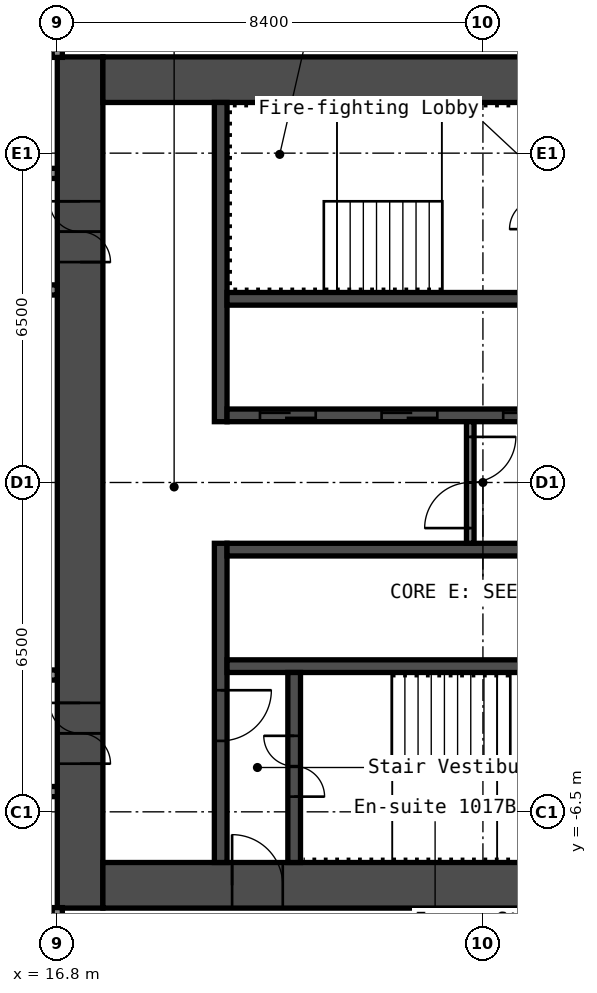
"""IFC4 building model, lengths in metres.
Left out: names, types, materials, properties, quantities, classifications, styles, units other than length and angle.
Written with IfcOpenShell. Run it as: python <this file> out.ifc"""

import sys

from ifc_helpers import new_model, si_unit, direction, frame, frame_2d, origin, place, context, subcontext, project, spatial, rectangle, extrude, element, fill, save


model = new_model("IFC4")
c1 = context("Model", 3, precision=1e-05, world=origin(), true_north=direction((0.0, 1.0)))
c2 = subcontext(c1, "Body", "Model", "MODEL_VIEW")
j1 = project(units=[si_unit("LENGTHUNIT", "METRE"), si_unit("PLANEANGLEUNIT", "RADIAN")], contexts=[c1])
p1 = place(None, origin())
s1 = spatial("IfcSite", under=j1, at=p1, CompositionType="ELEMENT")
p2 = place(p1, origin())
s2 = spatial("IfcBuilding", under=s1, at=p2, CompositionType="ELEMENT")
p3 = place(p2, frame((0.0, 0.0, 39.0)))
s3 = spatial("IfcBuildingStorey", under=s2, at=p3, CompositionType="ELEMENT", Elevation=39.0)
p4 = place(p3, frame((17.25, -8.4, 0.0), z_axis=(0.0, 0.0, 1.0), x_axis=(0.0, 1.0, 0.0)))
e1 = element("IfcWall", 1, at=p4, inside=s3, PredefinedType="SHEAR", context=c2, shape_type="SweptSolid", body=[
    extrude(rectangle(XDim=16.8, YDim=0.9, at=frame_2d((8.4, 0.0))), origin(), (0.0, 0.0, 1.0), 2.8),
])
p5 = place(p4, frame((12.75, 0.0, 0.0)))
e2 = element("IfcOpeningElement", 2, at=p5, cuts=e1, PredefinedType="OPENING", context=c2, shape_type="SweptSolid", body=[
    extrude(rectangle(XDim=1.2, YDim=2.1, at=frame_2d((0.6, 1.05))), frame((0.0, 0.46, 0.0), z_axis=(0.0, -1.0, 0.0), x_axis=(1.0, 0.0, 0.0)), (0.0, 0.0, 1.0), 0.92),
])
p6 = place(p4, frame((2.85, 0.0, 0.0)))
e3 = element("IfcOpeningElement", 3, at=p6, cuts=e1, PredefinedType="OPENING", context=c2, shape_type="SweptSolid", body=[
    extrude(rectangle(XDim=1.2, YDim=2.1, at=frame_2d((0.6, 1.05))), frame((0.0, 0.46, 0.0), z_axis=(0.0, -1.0, 0.0), x_axis=(1.0, 0.0, 0.0)), (0.0, 0.0, 1.0), 0.92),
])
p7 = place(p3, frame((17.7, 7.95, 0.0), z_axis=(0.0, 0.0, 1.0), x_axis=(1.0, 0.0, 0.0)))
e4 = element("IfcWall", 4, at=p7, inside=s3, PredefinedType="SHEAR", context=c2, shape_type="SweptSolid", body=[
    extrude(rectangle(XDim=15.0, YDim=0.9, at=frame_2d((7.5, 0.0))), origin(), (0.0, 0.0, 1.0), 2.8),
])
p8 = place(p7, frame((10.4, 0.0, 0.0)))
e5 = element("IfcOpeningElement", 5, at=p8, cuts=e4, PredefinedType="OPENING", context=c2, shape_type="SweptSolid", body=[
    extrude(rectangle(XDim=1.2, YDim=2.1, at=frame_2d((0.6, 1.05))), frame((0.0, 0.46, 0.0), z_axis=(0.0, -1.0, 0.0), x_axis=(1.0, 0.0, 0.0)), (0.0, 0.0, 1.0), 0.92),
])
p9 = place(p7, frame((13.35, 0.0, 0.0)))
e6 = element("IfcOpeningElement", 6, at=p9, cuts=e4, PredefinedType="OPENING", context=c2, shape_type="SweptSolid", body=[
    extrude(rectangle(XDim=0.9, YDim=2.1, at=frame_2d((0.45, 1.05))), frame((0.0, 0.46, 0.0), z_axis=(0.0, -1.0, 0.0), x_axis=(1.0, 0.0, 0.0)), (0.0, 0.0, 1.0), 0.92),
])
p10 = place(p3, frame((17.7, -7.95, 0.0), z_axis=(0.0, 0.0, 1.0), x_axis=(1.0, 0.0, 0.0)))
e7 = element("IfcWall", 7, at=p10, inside=s3, PredefinedType="SHEAR", context=c2, shape_type="SweptSolid", body=[
    extrude(rectangle(XDim=15.0, YDim=0.9, at=frame_2d((7.5, 0.0))), origin(), (0.0, 0.0, 1.0), 2.8),
])
p11 = place(p10, frame((2.55, 0.0, 0.0)))
e8 = element("IfcOpeningElement", 8, at=p11, cuts=e7, PredefinedType="OPENING", context=c2, shape_type="SweptSolid", body=[
    extrude(rectangle(XDim=1.0, YDim=2.1, at=frame_2d((0.5, 1.05))), frame((0.0, 0.46, 0.0), z_axis=(0.0, -1.0, 0.0), x_axis=(1.0, 0.0, 0.0)), (0.0, 0.0, 1.0), 0.92),
])
p12 = place(p3, frame((20.025, 1.2, 0.0), z_axis=(0.0, 0.0, 1.0), x_axis=(0.0, 1.0, 0.0)))
e9 = element("IfcWall", 9, at=p12, inside=s3, PredefinedType="SHEAR", context=c2, shape_type="SweptSolid", body=[
    extrude(rectangle(XDim=6.3, YDim=0.25, at=frame_2d((3.15, 0.0))), origin(), (0.0, 0.0, 1.0), 2.8),
])
p13 = place(p3, frame((20.025, -7.5, 0.0), z_axis=(0.0, 0.0, 1.0), x_axis=(0.0, 1.0, 0.0)))
e10 = element("IfcWall", 10, at=p13, inside=s3, PredefinedType="SHEAR", context=c2, shape_type="SweptSolid", body=[
    extrude(rectangle(XDim=6.3, YDim=0.25, at=frame_2d((3.15, 0.0))), origin(), (0.0, 0.0, 1.0), 2.8),
])
p14 = place(p13, frame((2.4, 0.0, 0.0)))
e11 = element("IfcOpeningElement", 11, at=p14, cuts=e10, PredefinedType="OPENING", context=c2, shape_type="SweptSolid", body=[
    extrude(rectangle(XDim=1.0, YDim=2.1, at=frame_2d((0.5, 1.05))), frame((0.0, 0.135, 0.0), z_axis=(0.0, -1.0, 0.0), x_axis=(1.0, 0.0, 0.0)), (0.0, 0.0, 1.0), 0.27),
])
p15 = place(p3, frame((20.15, 1.325, 0.0), z_axis=(0.0, 0.0, 1.0), x_axis=(1.0, 0.0, 0.0)))
e12 = element("IfcWall", 12, at=p15, inside=s3, PredefinedType="SHEAR", context=c2, shape_type="SweptSolid", body=[
    extrude(rectangle(XDim=7.5, YDim=0.25, at=frame_2d((3.75, 0.0))), origin(), (0.0, 0.0, 1.0), 2.8),
])
p16 = place(p15, frame((0.65, 0.0, 0.0)))
e13 = element("IfcOpeningElement", 13, at=p16, cuts=e12, PredefinedType="OPENING", context=c2, shape_type="SweptSolid", body=[
    extrude(rectangle(XDim=1.1, YDim=2.1, at=frame_2d((0.55, 1.05))), frame((0.0, 0.135, 0.0), z_axis=(0.0, -1.0, 0.0), x_axis=(1.0, 0.0, 0.0)), (0.0, 0.0, 1.0), 0.27),
])
p17 = place(p15, frame((3.05, 0.0, 0.0)))
e14 = element("IfcOpeningElement", 14, at=p17, cuts=e12, PredefinedType="OPENING", context=c2, shape_type="SweptSolid", body=[
    extrude(rectangle(XDim=1.1, YDim=2.1, at=frame_2d((0.55, 1.05))), frame((0.0, 0.135, 0.0), z_axis=(0.0, -1.0, 0.0), x_axis=(1.0, 0.0, 0.0)), (0.0, 0.0, 1.0), 0.27),
])
p18 = place(p15, frame((5.45, 0.0, 0.0)))
e15 = element("IfcOpeningElement", 15, at=p18, cuts=e12, PredefinedType="OPENING", context=c2, shape_type="SweptSolid", body=[
    extrude(rectangle(XDim=1.1, YDim=2.1, at=frame_2d((0.55, 1.05))), frame((0.0, 0.135, 0.0), z_axis=(0.0, -1.0, 0.0), x_axis=(1.0, 0.0, 0.0)), (0.0, 0.0, 1.0), 0.27),
])
for number, where, z_axis, x_axis in (
    (16, (20.15, 3.625, 0.0), (0.0, 0.0, 1.0), (1.0, 0.0, 0.0)),
    (17, (20.15, -1.325, 0.0), (0.0, 0.0, 1.0), (1.0, 0.0, 0.0)),
    (18, (20.15, -3.625, 0.0), (0.0, 0.0, 1.0), (1.0, 0.0, 0.0)),
):
    element("IfcWall", number, at=place(p3, frame(where, z_axis=z_axis, x_axis=x_axis)), inside=s3, PredefinedType="SHEAR", context=c2, shape_type="SweptSolid", body=[
        extrude(rectangle(XDim=7.5, YDim=0.25, at=frame_2d((3.75, 0.0))), origin(), (0.0, 0.0, 1.0), 2.8),
    ])
p19 = place(p3, frame((21.475, -7.5, 0.0), z_axis=(0.0, 0.0, 1.0), x_axis=(0.0, 1.0, 0.0)))
e19 = element("IfcWall", 19, at=p19, inside=s3, PredefinedType="SHEAR", context=c2, shape_type="SweptSolid", body=[
    extrude(rectangle(XDim=3.75, YDim=0.25, at=frame_2d((1.875, 0.0))), origin(), (0.0, 0.0, 1.0), 2.8),
])
p20 = place(p19, frame((1.3, 0.0, 0.0)))
e20 = element("IfcOpeningElement", 20, at=p20, cuts=e19, PredefinedType="OPENING", context=c2, shape_type="SweptSolid", body=[
    extrude(rectangle(XDim=1.2, YDim=2.1, at=frame_2d((0.6, 1.05))), frame((0.0, 0.135, 0.0), z_axis=(0.0, -1.0, 0.0), x_axis=(1.0, 0.0, 0.0)), (0.0, 0.0, 1.0), 0.27),
])
p21 = place(p3, frame((24.95, -1.2, 0.0), z_axis=(0.0, 0.0, 1.0), x_axis=(0.0, 1.0, 0.0)))
e21 = element("IfcWall", 21, at=p21, inside=s3, PredefinedType="PARTITIONING", context=c2, shape_type="SweptSolid", body=[
    extrude(rectangle(XDim=2.4, YDim=0.15, at=frame_2d((1.2, 0.0))), origin(), (0.0, 0.0, 1.0), 2.8),
])
p22 = place(p21, frame((0.3, 0.0, 0.0)))
e22 = element("IfcOpeningElement", 22, at=p22, cuts=e21, PredefinedType="OPENING", context=c2, shape_type="SweptSolid", body=[
    extrude(rectangle(XDim=1.8, YDim=2.1, at=frame_2d((0.9, 1.05))), frame((0.0, 0.085, 0.0), z_axis=(0.0, -1.0, 0.0), x_axis=(1.0, 0.0, 0.0)), (0.0, 0.0, 1.0), 0.17),
])
p23 = place(p3, frame((-16.8, -6.1, 0.0), z_axis=(0.0, 0.0, 1.0), x_axis=(1.0, 0.0, 0.0)))
e23 = element("IfcWall", 23, at=p23, inside=s3, PredefinedType="PARTITIONING", context=c2, shape_type="SweptSolid", body=[
    extrude(rectangle(XDim=33.6, YDim=0.2, at=frame_2d((16.8, 0.0))), origin(), (0.0, 0.0, 1.0), 2.8),
])
p24 = place(p23, frame((2.85, 0.0, 0.0)))
e24 = element("IfcOpeningElement", 24, at=p24, cuts=e23, PredefinedType="OPENING", context=c2, shape_type="SweptSolid", body=[
    extrude(rectangle(XDim=1.0, YDim=2.1, at=frame_2d((0.5, 1.05))), frame((0.0, 0.11, 0.0), z_axis=(0.0, -1.0, 0.0), x_axis=(1.0, 0.0, 0.0)), (0.0, 0.0, 1.0), 0.22),
])
p25 = place(p23, frame((4.55, 0.0, 0.0)))
e25 = element("IfcOpeningElement", 25, at=p25, cuts=e23, PredefinedType="OPENING", context=c2, shape_type="SweptSolid", body=[
    extrude(rectangle(XDim=1.0, YDim=2.1, at=frame_2d((0.5, 1.05))), frame((0.0, 0.11, 0.0), z_axis=(0.0, -1.0, 0.0), x_axis=(1.0, 0.0, 0.0)), (0.0, 0.0, 1.0), 0.22),
])
p26 = place(p23, frame((11.25, 0.0, 0.0)))
e26 = element("IfcOpeningElement", 26, at=p26, cuts=e23, PredefinedType="OPENING", context=c2, shape_type="SweptSolid", body=[
    extrude(rectangle(XDim=1.0, YDim=2.1, at=frame_2d((0.5, 1.05))), frame((0.0, 0.11, 0.0), z_axis=(0.0, -1.0, 0.0), x_axis=(1.0, 0.0, 0.0)), (0.0, 0.0, 1.0), 0.22),
])
p27 = place(p23, frame((12.95, 0.0, 0.0)))
e27 = element("IfcOpeningElement", 27, at=p27, cuts=e23, PredefinedType="OPENING", context=c2, shape_type="SweptSolid", body=[
    extrude(rectangle(XDim=1.0, YDim=2.1, at=frame_2d((0.5, 1.05))), frame((0.0, 0.11, 0.0), z_axis=(0.0, -1.0, 0.0), x_axis=(1.0, 0.0, 0.0)), (0.0, 0.0, 1.0), 0.22),
])
p28 = place(p23, frame((18.28, 0.0, 0.0)))
e28 = element("IfcOpeningElement", 28, at=p28, cuts=e23, PredefinedType="OPENING", context=c2, shape_type="SweptSolid", body=[
    extrude(rectangle(XDim=0.9, YDim=2.1, at=frame_2d((0.45, 1.05))), frame((0.0, 0.11, 0.0), z_axis=(0.0, -1.0, 0.0), x_axis=(1.0, 0.0, 0.0)), (0.0, 0.0, 1.0), 0.22),
])
p29 = place(p23, frame((22.48, 0.0, 0.0)))
e29 = element("IfcOpeningElement", 29, at=p29, cuts=e23, PredefinedType="OPENING", context=c2, shape_type="SweptSolid", body=[
    extrude(rectangle(XDim=0.9, YDim=2.1, at=frame_2d((0.45, 1.05))), frame((0.0, 0.11, 0.0), z_axis=(0.0, -1.0, 0.0), x_axis=(1.0, 0.0, 0.0)), (0.0, 0.0, 1.0), 0.22),
])
p30 = place(p23, frame((28.05, 0.0, 0.0)))
e30 = element("IfcOpeningElement", 30, at=p30, cuts=e23, PredefinedType="OPENING", context=c2, shape_type="SweptSolid", body=[
    extrude(rectangle(XDim=1.0, YDim=2.1, at=frame_2d((0.5, 1.05))), frame((0.0, 0.11, 0.0), z_axis=(0.0, -1.0, 0.0), x_axis=(1.0, 0.0, 0.0)), (0.0, 0.0, 1.0), 0.22),
])
p31 = place(p23, frame((29.75, 0.0, 0.0)))
e31 = element("IfcOpeningElement", 31, at=p31, cuts=e23, PredefinedType="OPENING", context=c2, shape_type="SweptSolid", body=[
    extrude(rectangle(XDim=1.0, YDim=2.1, at=frame_2d((0.5, 1.05))), frame((0.0, 0.11, 0.0), z_axis=(0.0, -1.0, 0.0), x_axis=(1.0, 0.0, 0.0)), (0.0, 0.0, 1.0), 0.22),
])
p32 = place(p3, frame((-16.8, -3.8, 0.0), z_axis=(0.0, 0.0, 1.0), x_axis=(1.0, 0.0, 0.0)))
e32 = element("IfcWall", 32, at=p32, inside=s3, PredefinedType="PARTITIONING", context=c2, shape_type="SweptSolid", body=[
    extrude(rectangle(XDim=33.6, YDim=0.2, at=frame_2d((16.8, 0.0))), origin(), (0.0, 0.0, 1.0), 2.8),
])
p33 = place(p32, frame((10.22, 0.0, 0.0)))
e33 = element("IfcOpeningElement", 33, at=p33, cuts=e32, PredefinedType="OPENING", context=c2, shape_type="SweptSolid", body=[
    extrude(rectangle(XDim=0.9, YDim=2.1, at=frame_2d((0.45, 1.05))), frame((0.0, 0.11, 0.0), z_axis=(0.0, -1.0, 0.0), x_axis=(1.0, 0.0, 0.0)), (0.0, 0.0, 1.0), 0.22),
])
p34 = place(p32, frame((14.42, 0.0, 0.0)))
e34 = element("IfcOpeningElement", 34, at=p34, cuts=e32, PredefinedType="OPENING", context=c2, shape_type="SweptSolid", body=[
    extrude(rectangle(XDim=0.9, YDim=2.1, at=frame_2d((0.45, 1.05))), frame((0.0, 0.11, 0.0), z_axis=(0.0, -1.0, 0.0), x_axis=(1.0, 0.0, 0.0)), (0.0, 0.0, 1.0), 0.22),
])
p35 = place(p32, frame((27.1, 0.0, 0.0)))
e35 = element("IfcOpeningElement", 35, at=p35, cuts=e32, PredefinedType="OPENING", context=c2, shape_type="SweptSolid", body=[
    extrude(rectangle(XDim=0.9, YDim=2.1, at=frame_2d((0.45, 1.05))), frame((0.0, 0.11, 0.0), z_axis=(0.0, -1.0, 0.0), x_axis=(1.0, 0.0, 0.0)), (0.0, 0.0, 1.0), 0.22),
])
p36 = place(p32, frame((31.3, 0.0, 0.0)))
e36 = element("IfcOpeningElement", 36, at=p36, cuts=e32, PredefinedType="OPENING", context=c2, shape_type="SweptSolid", body=[
    extrude(rectangle(XDim=0.9, YDim=2.1, at=frame_2d((0.45, 1.05))), frame((0.0, 0.11, 0.0), z_axis=(0.0, -1.0, 0.0), x_axis=(1.0, 0.0, 0.0)), (0.0, 0.0, 1.0), 0.22),
])
p37 = place(p3, frame((-16.8, 3.8, 0.0), z_axis=(0.0, 0.0, 1.0), x_axis=(1.0, 0.0, 0.0)))
e37 = element("IfcWall", 37, at=p37, inside=s3, PredefinedType="PARTITIONING", context=c2, shape_type="SweptSolid", body=[
    extrude(rectangle(XDim=33.6, YDim=0.2, at=frame_2d((16.8, 0.0))), origin(), (0.0, 0.0, 1.0), 2.8),
])
p38 = place(p37, frame((1.145, 0.0, 0.0)))
e38 = element("IfcOpeningElement", 38, at=p38, cuts=e37, PredefinedType="OPENING", context=c2, shape_type="SweptSolid", body=[
    extrude(rectangle(XDim=0.9, YDim=2.1, at=frame_2d((0.45, 1.05))), frame((0.0, 0.11, 0.0), z_axis=(0.0, -1.0, 0.0), x_axis=(1.0, 0.0, 0.0)), (0.0, 0.0, 1.0), 0.22),
])
p39 = place(p37, frame((5.345, 0.0, 0.0)))
e39 = element("IfcOpeningElement", 39, at=p39, cuts=e37, PredefinedType="OPENING", context=c2, shape_type="SweptSolid", body=[
    extrude(rectangle(XDim=0.9, YDim=2.1, at=frame_2d((0.45, 1.05))), frame((0.0, 0.11, 0.0), z_axis=(0.0, -1.0, 0.0), x_axis=(1.0, 0.0, 0.0)), (0.0, 0.0, 1.0), 0.22),
])
p40 = place(p37, frame((18.87, 0.0, 0.0)))
e40 = element("IfcOpeningElement", 40, at=p40, cuts=e37, PredefinedType="OPENING", context=c2, shape_type="SweptSolid", body=[
    extrude(rectangle(XDim=0.9, YDim=2.1, at=frame_2d((0.45, 1.05))), frame((0.0, 0.11, 0.0), z_axis=(0.0, -1.0, 0.0), x_axis=(1.0, 0.0, 0.0)), (0.0, 0.0, 1.0), 0.22),
])
p41 = place(p37, frame((23.07, 0.0, 0.0)))
e41 = element("IfcOpeningElement", 41, at=p41, cuts=e37, PredefinedType="OPENING", context=c2, shape_type="SweptSolid", body=[
    extrude(rectangle(XDim=0.9, YDim=2.1, at=frame_2d((0.45, 1.05))), frame((0.0, 0.11, 0.0), z_axis=(0.0, -1.0, 0.0), x_axis=(1.0, 0.0, 0.0)), (0.0, 0.0, 1.0), 0.22),
])
p42 = place(p3, frame((-16.8, 6.1, 0.0), z_axis=(0.0, 0.0, 1.0), x_axis=(1.0, 0.0, 0.0)))
e42 = element("IfcWall", 42, at=p42, inside=s3, PredefinedType="PARTITIONING", context=c2, shape_type="SweptSolid", body=[
    extrude(rectangle(XDim=33.6, YDim=0.2, at=frame_2d((16.8, 0.0))), origin(), (0.0, 0.0, 1.0), 2.8),
])
p43 = place(p42, frame((2.85, 0.0, 0.0)))
e43 = element("IfcOpeningElement", 43, at=p43, cuts=e42, PredefinedType="OPENING", context=c2, shape_type="SweptSolid", body=[
    extrude(rectangle(XDim=1.0, YDim=2.1, at=frame_2d((0.5, 1.05))), frame((0.0, 0.11, 0.0), z_axis=(0.0, -1.0, 0.0), x_axis=(1.0, 0.0, 0.0)), (0.0, 0.0, 1.0), 0.22),
])
p44 = place(p42, frame((4.55, 0.0, 0.0)))
e44 = element("IfcOpeningElement", 44, at=p44, cuts=e42, PredefinedType="OPENING", context=c2, shape_type="SweptSolid", body=[
    extrude(rectangle(XDim=1.0, YDim=2.1, at=frame_2d((0.5, 1.05))), frame((0.0, 0.11, 0.0), z_axis=(0.0, -1.0, 0.0), x_axis=(1.0, 0.0, 0.0)), (0.0, 0.0, 1.0), 0.22),
])
p45 = place(p42, frame((10.555, 0.0, 0.0)))
e45 = element("IfcOpeningElement", 45, at=p45, cuts=e42, PredefinedType="OPENING", context=c2, shape_type="SweptSolid", body=[
    extrude(rectangle(XDim=0.9, YDim=2.1, at=frame_2d((0.45, 1.05))), frame((0.0, 0.11, 0.0), z_axis=(0.0, -1.0, 0.0), x_axis=(1.0, 0.0, 0.0)), (0.0, 0.0, 1.0), 0.22),
])
p46 = place(p42, frame((14.755, 0.0, 0.0)))
e46 = element("IfcOpeningElement", 46, at=p46, cuts=e42, PredefinedType="OPENING", context=c2, shape_type="SweptSolid", body=[
    extrude(rectangle(XDim=0.9, YDim=2.1, at=frame_2d((0.45, 1.05))), frame((0.0, 0.11, 0.0), z_axis=(0.0, -1.0, 0.0), x_axis=(1.0, 0.0, 0.0)), (0.0, 0.0, 1.0), 0.22),
])
p47 = place(p42, frame((19.65, 0.0, 0.0)))
e47 = element("IfcOpeningElement", 47, at=p47, cuts=e42, PredefinedType="OPENING", context=c2, shape_type="SweptSolid", body=[
    extrude(rectangle(XDim=1.0, YDim=2.1, at=frame_2d((0.5, 1.05))), frame((0.0, 0.11, 0.0), z_axis=(0.0, -1.0, 0.0), x_axis=(1.0, 0.0, 0.0)), (0.0, 0.0, 1.0), 0.22),
])
p48 = place(p42, frame((21.35, 0.0, 0.0)))
e48 = element("IfcOpeningElement", 48, at=p48, cuts=e42, PredefinedType="OPENING", context=c2, shape_type="SweptSolid", body=[
    extrude(rectangle(XDim=1.0, YDim=2.1, at=frame_2d((0.5, 1.05))), frame((0.0, 0.11, 0.0), z_axis=(0.0, -1.0, 0.0), x_axis=(1.0, 0.0, 0.0)), (0.0, 0.0, 1.0), 0.22),
])
p49 = place(p42, frame((28.05, 0.0, 0.0)))
e49 = element("IfcOpeningElement", 49, at=p49, cuts=e42, PredefinedType="OPENING", context=c2, shape_type="SweptSolid", body=[
    extrude(rectangle(XDim=1.0, YDim=2.1, at=frame_2d((0.5, 1.05))), frame((0.0, 0.11, 0.0), z_axis=(0.0, -1.0, 0.0), x_axis=(1.0, 0.0, 0.0)), (0.0, 0.0, 1.0), 0.22),
])
p50 = place(p42, frame((29.75, 0.0, 0.0)))
e50 = element("IfcOpeningElement", 50, at=p50, cuts=e42, PredefinedType="OPENING", context=c2, shape_type="SweptSolid", body=[
    extrude(rectangle(XDim=1.0, YDim=2.1, at=frame_2d((0.5, 1.05))), frame((0.0, 0.11, 0.0), z_axis=(0.0, -1.0, 0.0), x_axis=(1.0, 0.0, 0.0)), (0.0, 0.0, 1.0), 0.22),
])
for number, where, z_axis, x_axis in (
    (51, (16.8, -20.3, 0.0), (0.0, 0.0, 1.0), (0.0, 1.0, 0.0)),
    (52, (16.8, 8.39, 0.0), (0.0, 0.0, 1.0), (0.0, 1.0, 0.0)),
):
    element("IfcWall", number, at=place(p3, frame(where, z_axis=z_axis, x_axis=x_axis)), inside=s3, PredefinedType="PARTITIONING", context=c2, shape_type="SweptSolid", body=[
        extrude(rectangle(XDim=11.91, YDim=0.2, at=frame_2d((5.955, 0.0))), origin(), (0.0, 0.0, 1.0), 2.8),
    ])
p51 = place(p5, origin())
e53 = element("IfcDoor", 53, at=p51, inside=s3, OperationType="DOUBLE_DOOR_SINGLE_SWING", PredefinedType="DOOR", context=c2, shape_type="SweptSolid", body=[
    extrude(rectangle(XDim=1.2, YDim=2.1, at=frame_2d((0.6, 1.05))), frame((0.0, 0.025, 0.0), z_axis=(0.0, -1.0, 0.0), x_axis=(1.0, 0.0, 0.0)), (0.0, 0.0, 1.0), 0.05),
])
fill(e2, e53)
p52 = place(p6, origin())
e54 = element("IfcDoor", 54, at=p52, inside=s3, OperationType="DOUBLE_DOOR_SINGLE_SWING", PredefinedType="DOOR", context=c2, shape_type="SweptSolid", body=[
    extrude(rectangle(XDim=1.2, YDim=2.1, at=frame_2d((0.6, 1.05))), frame((0.0, 0.025, 0.0), z_axis=(0.0, -1.0, 0.0), x_axis=(1.0, 0.0, 0.0)), (0.0, 0.0, 1.0), 0.05),
])
fill(e3, e54)
p53 = place(p11, origin())
e55 = element("IfcDoor", 55, at=p53, inside=s3, OperationType="SINGLE_SWING_RIGHT", PredefinedType="DOOR", context=c2, shape_type="SweptSolid", body=[
    extrude(rectangle(XDim=1.0, YDim=2.1, at=frame_2d((0.5, 1.05))), frame((0.0, 0.025, 0.0), z_axis=(0.0, -1.0, 0.0), x_axis=(1.0, 0.0, 0.0)), (0.0, 0.0, 1.0), 0.05),
])
fill(e8, e55)
p54 = place(p20, origin())
e56 = element("IfcDoor", 56, at=p54, inside=s3, OperationType="DOUBLE_DOOR_SINGLE_SWING", PredefinedType="DOOR", context=c2, shape_type="SweptSolid", body=[
    extrude(rectangle(XDim=1.2, YDim=2.1, at=frame_2d((0.6, 1.05))), frame((0.0, 0.025, 0.0), z_axis=(0.0, -1.0, 0.0), x_axis=(1.0, 0.0, 0.0)), (0.0, 0.0, 1.0), 0.05),
])
fill(e20, e56)
p55 = place(p14, origin())
e57 = element("IfcDoor", 57, at=p55, inside=s3, OperationType="SINGLE_SWING_RIGHT", PredefinedType="DOOR", context=c2, shape_type="SweptSolid", body=[
    extrude(rectangle(XDim=1.0, YDim=2.1, at=frame_2d((0.5, 1.05))), frame((0.0, 0.025, 0.0), z_axis=(0.0, -1.0, 0.0), x_axis=(1.0, 0.0, 0.0)), (0.0, 0.0, 1.0), 0.05),
])
fill(e11, e57)
p56 = place(p22, origin())
e58 = element("IfcDoor", 58, at=p56, inside=s3, OperationType="DOUBLE_DOOR_SINGLE_SWING", PredefinedType="DOOR", context=c2, shape_type="SweptSolid", body=[
    extrude(rectangle(XDim=1.8, YDim=2.1, at=frame_2d((0.9, 1.05))), frame((0.0, 0.025, 0.0), z_axis=(0.0, -1.0, 0.0), x_axis=(1.0, 0.0, 0.0)), (0.0, 0.0, 1.0), 0.05),
])
fill(e22, e58)
p57 = place(p16, origin())
e59 = element("IfcDoor", 59, at=p57, inside=s3, OperationType="DOUBLE_DOOR_SLIDING", PredefinedType="DOOR", context=c2, shape_type="SweptSolid", body=[
    extrude(rectangle(XDim=1.1, YDim=2.1, at=frame_2d((0.55, 1.05))), frame((0.0, 0.025, 0.0), z_axis=(0.0, -1.0, 0.0), x_axis=(1.0, 0.0, 0.0)), (0.0, 0.0, 1.0), 0.05),
])
fill(e13, e59)
p58 = place(p17, origin())
e60 = element("IfcDoor", 60, at=p58, inside=s3, OperationType="DOUBLE_DOOR_SLIDING", PredefinedType="DOOR", context=c2, shape_type="SweptSolid", body=[
    extrude(rectangle(XDim=1.1, YDim=2.1, at=frame_2d((0.55, 1.05))), frame((0.0, 0.025, 0.0), z_axis=(0.0, -1.0, 0.0), x_axis=(1.0, 0.0, 0.0)), (0.0, 0.0, 1.0), 0.05),
])
fill(e14, e60)
p59 = place(p18, origin())
e61 = element("IfcDoor", 61, at=p59, inside=s3, OperationType="DOUBLE_DOOR_SLIDING", PredefinedType="DOOR", context=c2, shape_type="SweptSolid", body=[
    extrude(rectangle(XDim=1.1, YDim=2.1, at=frame_2d((0.55, 1.05))), frame((0.0, 0.025, 0.0), z_axis=(0.0, -1.0, 0.0), x_axis=(1.0, 0.0, 0.0)), (0.0, 0.0, 1.0), 0.05),
])
fill(e15, e61)
save(model, sys.argv[1])
